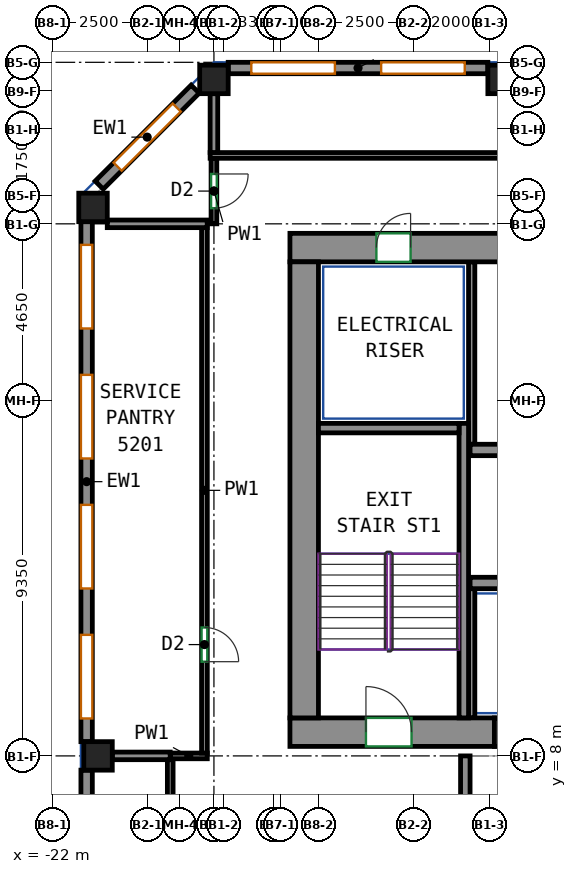
"""IFC4 building model, lengths in metres.
Left out: names, types, materials, properties, quantities, classifications, styles, units other than length and angle.
Written with IfcOpenShell. Run it as: python <this file> out.ifc"""

import sys

from ifc_helpers import new_model, si_unit, direction, frame, frame_2d, origin, origin_2d, place, context, subcontext, project, spatial, rectangle, extrude, source, transform, mapped, element, fill, save


model = new_model("IFC4")
c1 = context("Model", 3, precision=1e-05, world=origin(), true_north=direction((0.0, 1.0)))
c2 = subcontext(c1, "Body", "Model", "MODEL_VIEW")
j1 = project(units=[si_unit("LENGTHUNIT", "METRE"), si_unit("PLANEANGLEUNIT", "RADIAN")], contexts=[c1])
p1 = place(None, origin())
s1 = spatial("IfcSite", under=j1, at=p1, CompositionType="ELEMENT")
p2 = place(p1, origin())
s2 = spatial("IfcBuilding", under=s1, at=p2, CompositionType="ELEMENT")
p3 = place(p2, frame((0.0, 0.0, 213.5)))
s3 = spatial("IfcBuildingStorey", under=s2, at=p3, CompositionType="ELEMENT", Elevation=213.5)
m1 = source(origin(), c2, "Body", "SweptSolid", [
    extrude(rectangle(XDim=0.75, YDim=0.75, at=origin_2d()), origin(), (0.0, 0.0, 1.0), 3.12),
])
for number, where, z_axis, x_axis in (
    (1, (-20.932, 22.432, 0.0), (0.0, 0.0, 1.0), (1.0, 0.0, 0.0)),
    (2, (-20.8, 8.0, 0.0), (0.0, 0.0, 1.0), (1.0, 0.0, 0.0)),
    (3, (-17.75, 25.8, 0.0), (0.0, 0.0, 1.0), (1.0, 0.0, 0.0)),
    (4, (-10.167, 25.8, 0.0), (0.0, 0.0, 1.0), (1.0, 0.0, 0.0)),
):
    element("IfcColumn", number, at=place(p3, frame(where, z_axis=z_axis, x_axis=x_axis)), inside=s3, PredefinedType="COLUMN", context=c2, shape_type="MappedRepresentation", body=[
        mapped(m1, transform((0.0, 0.0, 0.0))),
    ])
m2 = source(origin(), c2, "Body", "SweptSolid", [
    extrude(rectangle(XDim=5.38, YDim=0.75, at=frame_2d((2.69, 0.0))), origin(), (0.0, 0.0, 1.0), 3.12),
])
p4 = place(p3, frame((-15.75, 8.625, 0.0), z_axis=(0.0, 0.0, 1.0), x_axis=(1.0, 0.0, 0.0)))
e5 = element("IfcWall", 5, at=p4, inside=s3, PredefinedType="SHEAR", context=c2, shape_type="MappedRepresentation", body=[
    mapped(m2, transform((0.0, 0.0, 0.0))),
])
p5 = place(p4, frame((2.0, 0.0, 0.0)))
e6 = element("IfcOpeningElement", 6, at=p5, cuts=e5, PredefinedType="OPENING", context=c2, shape_type="SweptSolid", body=[
    extrude(rectangle(XDim=1.2, YDim=2.1, at=frame_2d((0.6, 1.05))), frame((0.0, 0.385, 0.0), z_axis=(0.0, -1.0, 0.0), x_axis=(1.0, 0.0, 0.0)), (0.0, 0.0, 1.0), 0.77),
])
m3 = source(origin(), c2, "Body", "SweptSolid", [
    extrude(rectangle(XDim=33.6, YDim=0.75, at=frame_2d((16.8, 0.0))), origin(), (0.0, 0.0, 1.0), 3.12),
])
p6 = place(p3, frame((-15.75, 21.375, 0.0), z_axis=(0.0, 0.0, 1.0), x_axis=(1.0, 0.0, 0.0)))
e7 = element("IfcWall", 7, at=p6, inside=s3, PredefinedType="SHEAR", context=c2, shape_type="MappedRepresentation", body=[
    mapped(m3, transform((0.0, 0.0, 0.0))),
])
p7 = place(p6, frame((6.581, 0.0, 0.0)))
e8 = element("IfcOpeningElement", 8, at=p7, cuts=e7, PredefinedType="OPENING", context=c2, shape_type="SweptSolid", body=[
    extrude(rectangle(XDim=0.9, YDim=2.1, at=frame_2d((0.45, 1.05))), frame((0.0, 0.385, 0.0), z_axis=(0.0, -1.0, 0.0), x_axis=(1.0, 0.0, 0.0)), (0.0, 0.0, 1.0), 0.77),
])
p8 = place(p6, frame((11.888, 0.0, 0.0)))
e9 = element("IfcOpeningElement", 9, at=p8, cuts=e7, PredefinedType="OPENING", context=c2, shape_type="SweptSolid", body=[
    extrude(rectangle(XDim=0.9, YDim=2.1, at=frame_2d((0.45, 1.05))), frame((0.0, 0.385, 0.0), z_axis=(0.0, -1.0, 0.0), x_axis=(1.0, 0.0, 0.0)), (0.0, 0.0, 1.0), 0.77),
])
p9 = place(p6, frame((16.296, 0.0, 0.0)))
e10 = element("IfcOpeningElement", 10, at=p9, cuts=e7, PredefinedType="OPENING", context=c2, shape_type="SweptSolid", body=[
    extrude(rectangle(XDim=0.9, YDim=2.1, at=frame_2d((0.45, 1.05))), frame((0.0, 0.385, 0.0), z_axis=(0.0, -1.0, 0.0), x_axis=(1.0, 0.0, 0.0)), (0.0, 0.0, 1.0), 0.77),
])
p10 = place(p6, frame((18.708, 0.0, 0.0)))
e11 = element("IfcOpeningElement", 11, at=p10, cuts=e7, PredefinedType="OPENING", context=c2, shape_type="SweptSolid", body=[
    extrude(rectangle(XDim=0.9, YDim=2.1, at=frame_2d((0.45, 1.05))), frame((0.0, 0.385, 0.0), z_axis=(0.0, -1.0, 0.0), x_axis=(1.0, 0.0, 0.0)), (0.0, 0.0, 1.0), 0.77),
])
p11 = place(p6, frame((21.536, 0.0, 0.0)))
e12 = element("IfcOpeningElement", 12, at=p11, cuts=e7, PredefinedType="OPENING", context=c2, shape_type="SweptSolid", body=[
    extrude(rectangle(XDim=0.9, YDim=2.1, at=frame_2d((0.45, 1.05))), frame((0.0, 0.385, 0.0), z_axis=(0.0, -1.0, 0.0), x_axis=(1.0, 0.0, 0.0)), (0.0, 0.0, 1.0), 0.77),
])
p12 = place(p6, frame((25.877, 0.0, 0.0)))
e13 = element("IfcOpeningElement", 13, at=p12, cuts=e7, PredefinedType="OPENING", context=c2, shape_type="SweptSolid", body=[
    extrude(rectangle(XDim=0.9, YDim=2.1, at=frame_2d((0.45, 1.05))), frame((0.0, 0.385, 0.0), z_axis=(0.0, -1.0, 0.0), x_axis=(1.0, 0.0, 0.0)), (0.0, 0.0, 1.0), 0.77),
])
p13 = place(p6, frame((2.275, 0.0, 0.0)))
e14 = element("IfcOpeningElement", 14, at=p13, cuts=e7, PredefinedType="OPENING", context=c2, shape_type="SweptSolid", body=[
    extrude(rectangle(XDim=0.9, YDim=2.1, at=frame_2d((0.45, 1.05))), frame((0.0, 0.385, 0.0), z_axis=(0.0, -1.0, 0.0), x_axis=(1.0, 0.0, 0.0)), (0.0, 0.0, 1.0), 0.77),
])
p14 = place(p6, frame((30.425, 0.0, 0.0)))
e15 = element("IfcOpeningElement", 15, at=p14, cuts=e7, PredefinedType="OPENING", context=c2, shape_type="SweptSolid", body=[
    extrude(rectangle(XDim=0.9, YDim=2.1, at=frame_2d((0.45, 1.05))), frame((0.0, 0.385, 0.0), z_axis=(0.0, -1.0, 0.0), x_axis=(1.0, 0.0, 0.0)), (0.0, 0.0, 1.0), 0.77),
])
m4 = source(origin(), c2, "Body", "SweptSolid", [
    extrude(rectangle(XDim=12.0, YDim=0.75, at=frame_2d((6.0, 0.0))), origin(), (0.0, 0.0, 1.0), 3.12),
])
p15 = place(p3, frame((-15.375, 9.0, 0.0), z_axis=(0.0, 0.0, 1.0), x_axis=(0.0, 1.0, 0.0)))
e16 = element("IfcWall", 16, at=p15, inside=s3, PredefinedType="SHEAR", context=c2, shape_type="MappedRepresentation", body=[
    mapped(m4, transform((0.0, 0.0, 0.0))),
])
m5 = source(origin(), c2, "Body", "SweptSolid", [
    extrude(rectangle(XDim=7.75, YDim=0.25, at=frame_2d((3.875, 0.0))), origin(), (0.0, 0.0, 1.0), 3.12),
])
p16 = place(p3, frame((-11.175, 9.0, 0.0), z_axis=(0.0, 0.0, 1.0), x_axis=(0.0, 1.0, 0.0)))
e17 = element("IfcWall", 17, at=p16, inside=s3, PredefinedType="SHEAR", context=c2, shape_type="MappedRepresentation", body=[
    mapped(m5, transform((0.0, 0.0, 0.0))),
])
m6 = source(origin(), c2, "Body", "SweptSolid", [
    extrude(rectangle(XDim=3.7, YDim=0.25, at=frame_2d((1.85, 0.0))), origin(), (0.0, 0.0, 1.0), 3.12),
])
p17 = place(p3, frame((-15.0, 16.625, 0.0), z_axis=(0.0, 0.0, 1.0), x_axis=(1.0, 0.0, 0.0)))
e18 = element("IfcWall", 18, at=p17, inside=s3, PredefinedType="SHEAR", context=c2, shape_type="MappedRepresentation", body=[
    mapped(m6, transform((0.0, 0.0, 0.0))),
])
m7 = source(origin(), c2, "Body", "SweptSolid", [
    extrude(rectangle(XDim=6.0, YDim=0.3, at=frame_2d((3.0, 0.0))), origin(), (0.0, 0.0, 1.0), 3.12),
])
p18 = place(p3, frame((-11.01, 12.55, 0.0), z_axis=(0.0, 0.0, 1.0), x_axis=(1.0, 0.0, 0.0)))
e19 = element("IfcWall", 19, at=p18, inside=s3, PredefinedType="SHEAR", context=c2, shape_type="MappedRepresentation", body=[
    mapped(m7, transform((0.0, 0.0, 0.0))),
])
m8 = source(origin(), c2, "Body", "SweptSolid", [
    extrude(rectangle(XDim=14.04, YDim=0.3, at=frame_2d((7.02, 0.0))), origin(), (0.0, 0.0, 1.0), 3.12),
])
p19 = place(p3, frame((-11.01, 16.05, 0.0), z_axis=(0.0, 0.0, 1.0), x_axis=(1.0, 0.0, 0.0)))
e20 = element("IfcWall", 20, at=p19, inside=s3, PredefinedType="SHEAR", context=c2, shape_type="MappedRepresentation", body=[
    mapped(m8, transform((0.0, 0.0, 0.0))),
])
m9 = source(origin(), c2, "Body", "SweptSolid", [
    extrude(rectangle(XDim=6.833, YDim=0.3, at=frame_2d((3.417, 0.0))), origin(), (0.0, 0.0, 1.0), 3.12),
])
p20 = place(p3, frame((-10.542, 26.1, 0.0), z_axis=(0.0, 0.0, 1.0), x_axis=(-1.0, 0.0, 0.0)))
e21 = element("IfcWall", 21, at=p20, inside=s3, PredefinedType="SOLIDWALL", context=c2, shape_type="MappedRepresentation", body=[
    mapped(m9, transform((0.0, 0.0, 0.0))),
])
p21 = place(p20, frame((0.608, 0.0, 0.85)))
e22 = element("IfcOpeningElement", 22, at=p21, cuts=e21, PredefinedType="OPENING", context=c2, shape_type="SweptSolid", body=[
    extrude(rectangle(XDim=2.2, YDim=1.95, at=frame_2d((1.1, 0.975))), frame((0.0, 0.16, 0.0), z_axis=(0.0, -1.0, 0.0), x_axis=(1.0, 0.0, 0.0)), (0.0, 0.0, 1.0), 0.32),
])
p22 = place(p20, frame((4.025, 0.0, 0.85)))
e23 = element("IfcOpeningElement", 23, at=p22, cuts=e21, PredefinedType="OPENING", context=c2, shape_type="SweptSolid", body=[
    extrude(rectangle(XDim=2.2, YDim=1.95, at=frame_2d((1.1, 0.975))), frame((0.0, 0.16, 0.0), z_axis=(0.0, -1.0, 0.0), x_axis=(1.0, 0.0, 0.0)), (0.0, 0.0, 1.0), 0.32),
])
m10 = source(origin(), c2, "Body", "SweptSolid", [
    extrude(rectangle(XDim=3.571, YDim=0.3, at=frame_2d((1.786, 0.0))), origin(), (0.0, 0.0, 1.0), 3.12),
])
p23 = place(p3, frame((-18.244, 25.544, 0.0), z_axis=(0.0, 0.0, 1.0), x_axis=(-0.707072595841, -0.707140964879, 0.0)))
e24 = element("IfcWall", 24, at=p23, inside=s3, PredefinedType="SOLIDWALL", context=c2, shape_type="MappedRepresentation", body=[
    mapped(m10, transform((0.0, 0.0, 0.0))),
])
p24 = place(p23, frame((0.686, 0.0, 0.85)))
e25 = element("IfcOpeningElement", 25, at=p24, cuts=e24, PredefinedType="OPENING", context=c2, shape_type="SweptSolid", body=[
    extrude(rectangle(XDim=2.2, YDim=1.95, at=frame_2d((1.1, 0.975))), frame((0.0, 0.16, 0.0), z_axis=(0.0, -1.0, 0.0), x_axis=(1.0, 0.0, 0.0)), (0.0, 0.0, 1.0), 0.32),
])
m11 = source(origin(), c2, "Body", "SweptSolid", [
    extrude(rectangle(XDim=13.682, YDim=0.3, at=frame_2d((6.841, 0.0))), origin(), (0.0, 0.0, 1.0), 3.12),
])
p25 = place(p3, frame((-21.1, 22.057, 0.0), z_axis=(0.0, 0.0, 1.0), x_axis=(0.0, -1.0, 0.0)))
e26 = element("IfcWall", 26, at=p25, inside=s3, PredefinedType="SOLIDWALL", context=c2, shape_type="MappedRepresentation", body=[
    mapped(m11, transform((0.0, 0.0, 0.0))),
])
p26 = place(p25, frame((0.61, 0.0, 0.85)))
e27 = element("IfcOpeningElement", 27, at=p26, cuts=e26, PredefinedType="OPENING", context=c2, shape_type="SweptSolid", body=[
    extrude(rectangle(XDim=2.2, YDim=1.95, at=frame_2d((1.1, 0.975))), frame((0.0, 0.16, 0.0), z_axis=(0.0, -1.0, 0.0), x_axis=(1.0, 0.0, 0.0)), (0.0, 0.0, 1.0), 0.32),
])
p27 = place(p25, frame((4.031, 0.0, 0.85)))
e28 = element("IfcOpeningElement", 28, at=p27, cuts=e26, PredefinedType="OPENING", context=c2, shape_type="SweptSolid", body=[
    extrude(rectangle(XDim=2.2, YDim=1.95, at=frame_2d((1.1, 0.975))), frame((0.0, 0.16, 0.0), z_axis=(0.0, -1.0, 0.0), x_axis=(1.0, 0.0, 0.0)), (0.0, 0.0, 1.0), 0.32),
])
p28 = place(p25, frame((7.451, 0.0, 0.85)))
e29 = element("IfcOpeningElement", 29, at=p28, cuts=e26, PredefinedType="OPENING", context=c2, shape_type="SweptSolid", body=[
    extrude(rectangle(XDim=2.2, YDim=1.95, at=frame_2d((1.1, 0.975))), frame((0.0, 0.16, 0.0), z_axis=(0.0, -1.0, 0.0), x_axis=(1.0, 0.0, 0.0)), (0.0, 0.0, 1.0), 0.32),
])
p29 = place(p25, frame((10.872, 0.0, 0.85)))
e30 = element("IfcOpeningElement", 30, at=p29, cuts=e26, PredefinedType="OPENING", context=c2, shape_type="SweptSolid", body=[
    extrude(rectangle(XDim=2.2, YDim=1.95, at=frame_2d((1.1, 0.975))), frame((0.0, 0.16, 0.0), z_axis=(0.0, -1.0, 0.0), x_axis=(1.0, 0.0, 0.0)), (0.0, 0.0, 1.0), 0.32),
])
m12 = source(origin(), c2, "Body", "SweptSolid", [
    extrude(rectangle(XDim=7.812, YDim=0.3, at=frame_2d((3.906, 0.0))), origin(), (0.0, 0.0, 1.0), 3.12),
])
p30 = place(p3, frame((-21.1, 7.625, 0.0), z_axis=(0.0, 0.0, 1.0), x_axis=(0.0, -1.0, 0.0)))
e31 = element("IfcWall", 31, at=p30, inside=s3, PredefinedType="SOLIDWALL", context=c2, shape_type="MappedRepresentation", body=[
    mapped(m12, transform((0.0, 0.0, 0.0))),
])
p31 = place(p30, frame((0.853, 0.0, 0.85)))
e32 = element("IfcOpeningElement", 32, at=p31, cuts=e31, PredefinedType="OPENING", context=c2, shape_type="SweptSolid", body=[
    extrude(rectangle(XDim=2.2, YDim=1.95, at=frame_2d((1.1, 0.975))), frame((0.0, 0.16, 0.0), z_axis=(0.0, -1.0, 0.0), x_axis=(1.0, 0.0, 0.0)), (0.0, 0.0, 1.0), 0.32),
])
p32 = place(p30, frame((4.759, 0.0, 0.85)))
e33 = element("IfcOpeningElement", 33, at=p32, cuts=e31, PredefinedType="OPENING", context=c2, shape_type="SweptSolid", body=[
    extrude(rectangle(XDim=2.2, YDim=1.95, at=frame_2d((1.1, 0.975))), frame((0.0, 0.16, 0.0), z_axis=(0.0, -1.0, 0.0), x_axis=(1.0, 0.0, 0.0)), (0.0, 0.0, 1.0), 0.32),
])
m13 = source(origin(), c2, "Body", "SweptSolid", [
    extrude(rectangle(XDim=2.65, YDim=0.25, at=frame_2d((1.325, 0.0))), origin(), (0.0, 0.0, 1.0), 3.12),
])
p33 = place(p3, frame((-11.135, 5.35, 0.0), z_axis=(0.0, 0.0, 1.0), x_axis=(0.0, 1.0, 0.0)))
e34 = element("IfcWall", 34, at=p33, inside=s3, PredefinedType="PARTITIONING", context=c2, shape_type="MappedRepresentation", body=[
    mapped(m13, transform((0.0, 0.0, 0.0))),
])
m14 = source(origin(), c2, "Body", "SweptSolid", [
    extrude(rectangle(XDim=4.8, YDim=0.165, at=frame_2d((2.4, 0.0))), origin(), (0.0, 0.0, 1.0), 3.12),
])
p34 = place(p3, frame((-10.968, 16.2, 0.0), z_axis=(0.0, 0.0, 1.0), x_axis=(0.0, 1.0, 0.0)))
e35 = element("IfcWall", 35, at=p34, inside=s3, PredefinedType="PARTITIONING", context=c2, shape_type="MappedRepresentation", body=[
    mapped(m14, transform((0.0, 0.0, 0.0))),
])
m15 = source(origin(), c2, "Body", "SweptSolid", [
    extrude(rectangle(XDim=3.4, YDim=0.165, at=frame_2d((1.7, 0.0))), origin(), (0.0, 0.0, 1.0), 3.12),
])
p35 = place(p3, frame((-10.968, 9.0, 0.0), z_axis=(0.0, 0.0, 1.0), x_axis=(0.0, 1.0, 0.0)))
e36 = element("IfcWall", 36, at=p35, inside=s3, PredefinedType="PARTITIONING", context=c2, shape_type="MappedRepresentation", body=[
    mapped(m15, transform((0.0, 0.0, 0.0))),
])
m16 = source(origin(), c2, "Body", "SweptSolid", [
    extrude(rectangle(XDim=1.4, YDim=0.75, at=frame_2d((0.7, 0.0))), origin(), (0.0, 0.0, 1.0), 2.7),
])
p36 = place(p3, frame((-10.37, 8.625, 0.0), z_axis=(0.0, 0.0, 1.0), x_axis=(1.0, 0.0, 0.0)))
e37 = element("IfcWall", 37, at=p36, inside=s3, PredefinedType="PARTITIONING", context=c2, shape_type="MappedRepresentation", body=[
    mapped(m16, transform((0.0, 0.0, 0.0))),
])
p37 = place(p36, frame((0.25, 0.0, 0.0)))
e38 = element("IfcOpeningElement", 38, at=p37, cuts=e37, PredefinedType="OPENING", context=c2, shape_type="SweptSolid", body=[
    extrude(rectangle(XDim=0.9, YDim=2.1, at=frame_2d((0.45, 1.05))), frame((0.0, 0.385, 0.0), z_axis=(0.0, -1.0, 0.0), x_axis=(1.0, 0.0, 0.0)), (0.0, 0.0, 1.0), 0.77),
])
p38 = place(p3, frame((-17.925, 8.0, 0.0), z_axis=(0.0, 0.0, 1.0), x_axis=(-1.0, 0.0, 0.0)))
e39 = element("IfcWall", 39, at=p38, inside=s3, PredefinedType="PARTITIONING", context=c2, shape_type="SweptSolid", body=[
    extrude(rectangle(XDim=0.976, YDim=0.15, at=frame_2d((0.488, 0.0))), origin(), (0.0, 0.0, 1.0), 3.12),
])
p39 = place(p3, frame((-18.0, 21.9, 0.0), z_axis=(0.0, 0.0, 1.0), x_axis=(0.0, -1.0, 0.0)))
e40 = element("IfcWall", 40, at=p39, inside=s3, PredefinedType="PARTITIONING", context=c2, shape_type="SweptSolid", body=[
    extrude(rectangle(XDim=13.825, YDim=0.15, at=frame_2d((6.913, 0.0))), origin(), (0.0, 0.0, 1.0), 3.12),
])
p40 = place(p39, frame((10.521, 0.0, 0.0)))
e41 = element("IfcOpeningElement", 41, at=p40, cuts=e40, PredefinedType="OPENING", context=c2, shape_type="SweptSolid", body=[
    extrude(rectangle(XDim=0.9, YDim=2.1, at=frame_2d((0.45, 1.05))), frame((0.0, 0.085, 0.0), z_axis=(0.0, -1.0, 0.0), x_axis=(1.0, 0.0, 0.0)), (0.0, 0.0, 1.0), 0.17),
])
p41 = place(p3, frame((-18.9, 3.809, 0.0), z_axis=(0.0, 0.0, 1.0), x_axis=(0.0, 1.0, 0.0)))
e42 = element("IfcWall", 42, at=p41, inside=s3, PredefinedType="PARTITIONING", context=c2, shape_type="SweptSolid", body=[
    extrude(rectangle(XDim=4.092, YDim=0.15, at=frame_2d((2.046, 0.0))), origin(), (0.0, 0.0, 1.0), 3.12),
])
p42 = place(p41, frame((1.809, 0.0, 0.0)))
e43 = element("IfcOpeningElement", 43, at=p42, cuts=e42, PredefinedType="OPENING", context=c2, shape_type="SweptSolid", body=[
    extrude(rectangle(XDim=0.9, YDim=2.1, at=frame_2d((0.45, 1.05))), frame((0.0, 0.085, 0.0), z_axis=(0.0, -1.0, 0.0), x_axis=(1.0, 0.0, 0.0)), (0.0, 0.0, 1.0), 0.17),
])
p43 = place(p3, frame((-17.75, 23.725, 0.0), z_axis=(0.0, 0.0, 1.0), x_axis=(0.0, -1.0, 0.0)))
e44 = element("IfcWall", 44, at=p43, inside=s3, PredefinedType="PARTITIONING", context=c2, shape_type="SweptSolid", body=[
    extrude(rectangle(XDim=1.725, YDim=0.15, at=frame_2d((0.863, 0.0))), origin(), (0.0, 0.0, 1.0), 3.12),
])
p44 = place(p43, frame((0.413, 0.0, 0.0)))
e45 = element("IfcOpeningElement", 45, at=p44, cuts=e44, PredefinedType="OPENING", context=c2, shape_type="SweptSolid", body=[
    extrude(rectangle(XDim=0.9, YDim=2.1, at=frame_2d((0.45, 1.05))), frame((0.0, 0.085, 0.0), z_axis=(0.0, -1.0, 0.0), x_axis=(1.0, 0.0, 0.0)), (0.0, 0.0, 1.0), 0.17),
])
p45 = place(p3, frame((27.85, 23.8, 0.0), z_axis=(0.0, 0.0, 1.0), x_axis=(-1.0, 0.0, 0.0)))
e46 = element("IfcWall", 46, at=p45, inside=s3, PredefinedType="PARTITIONING", context=c2, shape_type="SweptSolid", body=[
    extrude(rectangle(XDim=45.7, YDim=0.15, at=frame_2d((22.85, 0.0))), origin(), (0.0, 0.0, 1.0), 3.12),
])
p46 = place(p45, frame((16.838, 0.0, 0.0)))
e47 = element("IfcOpeningElement", 47, at=p46, cuts=e46, PredefinedType="OPENING", context=c2, shape_type="SweptSolid", body=[
    extrude(rectangle(XDim=1.0, YDim=2.1, at=frame_2d((0.5, 1.05))), frame((0.0, 0.085, 0.0), z_axis=(0.0, -1.0, 0.0), x_axis=(1.0, 0.0, 0.0)), (0.0, 0.0, 1.0), 0.17),
])
p47 = place(p3, frame((-20.425, 8.0, 0.0), z_axis=(0.0, 0.0, 1.0), x_axis=(0.999999794741, 0.000640717472, 0.0)))
e48 = element("IfcWall", 48, at=p47, inside=s3, PredefinedType="PARTITIONING", context=c2, shape_type="SweptSolid", body=[
    extrude(rectangle(XDim=1.524, YDim=0.2, at=frame_2d((0.762, 0.0))), origin(), (0.0, 0.0, 1.0), 3.12),
])
p48 = place(p3, frame((-17.927, 22.0, 0.0), z_axis=(0.0, 0.0, 1.0), x_axis=(-1.0, 0.0, 0.0)))
e49 = element("IfcWall", 49, at=p48, inside=s3, PredefinedType="PARTITIONING", context=c2, shape_type="SweptSolid", body=[
    extrude(rectangle(XDim=2.63, YDim=0.2, at=frame_2d((1.315, 0.0))), origin(), (0.0, 0.0, 1.0), 3.12),
])
p49 = place(p3, frame((-17.75, 23.877, 0.0), z_axis=(0.0, 0.0, 1.0), x_axis=(0.0, 1.0, 0.0)))
e50 = element("IfcWall", 50, at=p49, inside=s3, PredefinedType="PARTITIONING", context=c2, shape_type="SweptSolid", body=[
    extrude(rectangle(XDim=1.548, YDim=0.2, at=frame_2d((0.774, 0.0))), origin(), (0.0, 0.0, 1.0), 3.12),
])
p50 = place(p21, origin())
e51 = element("IfcWindow", 51, at=p50, inside=s3, PartitioningType="SINGLE_PANEL", PredefinedType="WINDOW", context=c2, shape_type="SweptSolid", body=[
    extrude(rectangle(XDim=2.2, YDim=1.95, at=frame_2d((1.1, 0.975))), frame((0.0, 0.03, 0.0), z_axis=(0.0, -1.0, 0.0), x_axis=(1.0, 0.0, 0.0)), (0.0, 0.0, 1.0), 0.06),
])
fill(e22, e51)
p51 = place(p22, origin())
e52 = element("IfcWindow", 52, at=p51, inside=s3, PartitioningType="SINGLE_PANEL", PredefinedType="WINDOW", context=c2, shape_type="SweptSolid", body=[
    extrude(rectangle(XDim=2.2, YDim=1.95, at=frame_2d((1.1, 0.975))), frame((0.0, 0.03, 0.0), z_axis=(0.0, -1.0, 0.0), x_axis=(1.0, 0.0, 0.0)), (0.0, 0.0, 1.0), 0.06),
])
fill(e23, e52)
p52 = place(p24, origin())
e53 = element("IfcWindow", 53, at=p52, inside=s3, PartitioningType="SINGLE_PANEL", PredefinedType="WINDOW", context=c2, shape_type="SweptSolid", body=[
    extrude(rectangle(XDim=2.2, YDim=1.95, at=frame_2d((1.1, 0.975))), frame((0.0, 0.03, 0.0), z_axis=(0.0, -1.0, 0.0), x_axis=(1.0, 0.0, 0.0)), (0.0, 0.0, 1.0), 0.06),
])
fill(e25, e53)
p53 = place(p26, origin())
e54 = element("IfcWindow", 54, at=p53, inside=s3, PartitioningType="SINGLE_PANEL", PredefinedType="WINDOW", context=c2, shape_type="SweptSolid", body=[
    extrude(rectangle(XDim=2.2, YDim=1.95, at=frame_2d((1.1, 0.975))), frame((0.0, 0.03, 0.0), z_axis=(0.0, -1.0, 0.0), x_axis=(1.0, 0.0, 0.0)), (0.0, 0.0, 1.0), 0.06),
])
fill(e27, e54)
p54 = place(p27, origin())
e55 = element("IfcWindow", 55, at=p54, inside=s3, PartitioningType="SINGLE_PANEL", PredefinedType="WINDOW", context=c2, shape_type="SweptSolid", body=[
    extrude(rectangle(XDim=2.2, YDim=1.95, at=frame_2d((1.1, 0.975))), frame((0.0, 0.03, 0.0), z_axis=(0.0, -1.0, 0.0), x_axis=(1.0, 0.0, 0.0)), (0.0, 0.0, 1.0), 0.06),
])
fill(e28, e55)
p55 = place(p28, origin())
e56 = element("IfcWindow", 56, at=p55, inside=s3, PartitioningType="SINGLE_PANEL", PredefinedType="WINDOW", context=c2, shape_type="SweptSolid", body=[
    extrude(rectangle(XDim=2.2, YDim=1.95, at=frame_2d((1.1, 0.975))), frame((0.0, 0.03, 0.0), z_axis=(0.0, -1.0, 0.0), x_axis=(1.0, 0.0, 0.0)), (0.0, 0.0, 1.0), 0.06),
])
fill(e29, e56)
p56 = place(p29, origin())
e57 = element("IfcWindow", 57, at=p56, inside=s3, PartitioningType="SINGLE_PANEL", PredefinedType="WINDOW", context=c2, shape_type="SweptSolid", body=[
    extrude(rectangle(XDim=2.2, YDim=1.95, at=frame_2d((1.1, 0.975))), frame((0.0, 0.03, 0.0), z_axis=(0.0, -1.0, 0.0), x_axis=(1.0, 0.0, 0.0)), (0.0, 0.0, 1.0), 0.06),
])
fill(e30, e57)
p57 = place(p13, origin())
e58 = element("IfcDoor", 58, at=p57, inside=s3, OperationType="SINGLE_SWING_RIGHT", PredefinedType="DOOR", context=c2, shape_type="SweptSolid", body=[
    extrude(rectangle(XDim=0.9, YDim=2.1, at=frame_2d((0.45, 1.05))), frame((0.0, -0.23, 0.0), z_axis=(0.0, -1.0, 0.0), x_axis=(1.0, 0.0, 0.0)), (0.0, 0.0, 1.0), 0.05),
])
fill(e14, e58)
p58 = place(p5, origin())
e59 = element("IfcDoor", 59, at=p58, inside=s3, OperationType="DOUBLE_DOOR_SINGLE_SWING", PredefinedType="DOOR", context=c2, shape_type="SweptSolid", body=[
    extrude(rectangle(XDim=1.2, YDim=2.1, at=frame_2d((0.6, 1.05))), frame((0.0, 0.28, 0.0), z_axis=(0.0, -1.0, 0.0), x_axis=(1.0, 0.0, 0.0)), (0.0, 0.0, 1.0), 0.05),
])
fill(e6, e59)
p59 = place(p40, origin())
e60 = element("IfcDoor", 60, at=p59, inside=s3, OperationType="SINGLE_SWING_RIGHT", PredefinedType="DOOR", context=c2, shape_type="SweptSolid", body=[
    extrude(rectangle(XDim=0.9, YDim=2.1, at=frame_2d((0.45, 1.05))), frame((0.0, 0.025, 0.0), z_axis=(0.0, -1.0, 0.0), x_axis=(1.0, 0.0, 0.0)), (0.0, 0.0, 1.0), 0.05),
])
fill(e41, e60)
p60 = place(p44, origin())
e61 = element("IfcDoor", 61, at=p60, inside=s3, OperationType="SINGLE_SWING_LEFT", PredefinedType="DOOR", context=c2, shape_type="SweptSolid", body=[
    extrude(rectangle(XDim=0.9, YDim=2.1, at=frame_2d((0.45, 1.05))), frame((0.0, 0.025, 0.0), z_axis=(0.0, -1.0, 0.0), x_axis=(1.0, 0.0, 0.0)), (0.0, 0.0, 1.0), 0.05),
])
fill(e45, e61)
save(model, sys.argv[1])
